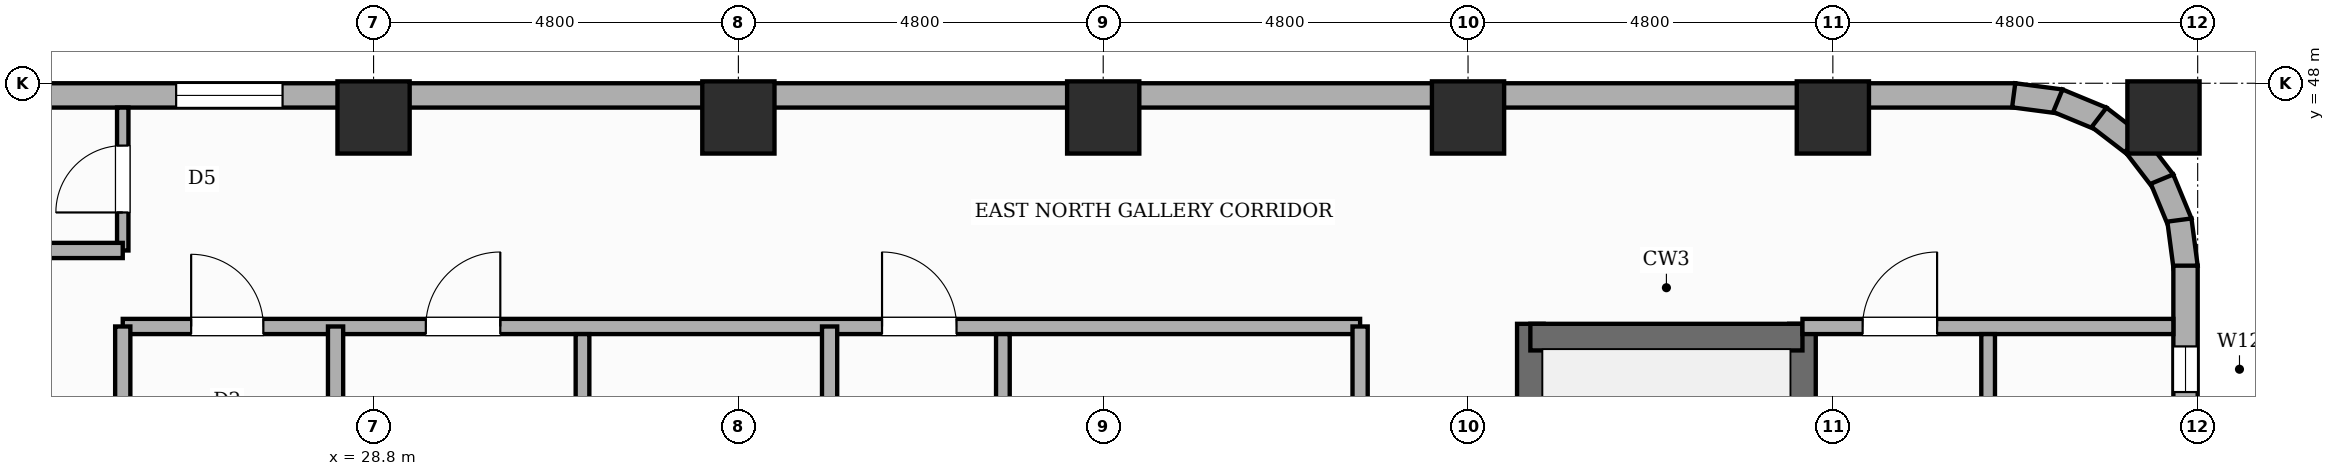
"""IFC4 building model, lengths in metres.
Left out: names, types, materials, properties, quantities, classifications, styles, units other than length and angle.
Written with IfcOpenShell. Run it as: python <this file> out.ifc"""

import sys

from ifc_helpers import new_model, si_unit, direction, frame, frame_2d, origin, origin_2d, place, context, subcontext, project, spatial, rectangle, extrude, element, fill, save


model = new_model("IFC4")
c1 = context("Model", 3, precision=1e-05, world=origin(), true_north=direction((0.0, 1.0)))
c2 = subcontext(c1, "Body", "Model", "MODEL_VIEW")
j1 = project(units=[si_unit("LENGTHUNIT", "METRE"), si_unit("PLANEANGLEUNIT", "RADIAN")], contexts=[c1])
p1 = place(None, origin())
s1 = spatial("IfcSite", under=j1, at=p1, CompositionType="ELEMENT")
p2 = place(p1, origin())
s2 = spatial("IfcBuilding", under=s1, at=p2, CompositionType="ELEMENT")
p3 = place(p2, frame((0.0, 0.0, 110.8)))
s3 = spatial("IfcBuildingStorey", under=s2, at=p3, CompositionType="ELEMENT", Elevation=110.8)
p4 = place(p3, frame((44.02, 35.865, 0.0), z_axis=(0.0, 0.0, 1.0), x_axis=(0.0, 1.0, 0.0)))
e1 = element("IfcWall", 1, at=p4, inside=s3, PredefinedType="SHEAR", context=c2, shape_type="SweptSolid", body=[
    extrude(rectangle(XDim=8.97, YDim=0.35, at=frame_2d((4.485, 0.0))), origin(), (0.0, 0.0, 1.0), 3.6),
])
p5 = place(p4, frame((0.65, 0.0, 0.0)))
e2 = element("IfcOpeningElement", 2, at=p5, cuts=e1, PredefinedType="OPENING", context=c2, shape_type="SweptSolid", body=[
    extrude(rectangle(XDim=0.95, YDim=2.1, at=frame_2d((0.475, 1.05))), frame((0.0, 0.185, 0.0), z_axis=(0.0, -1.0, 0.0), x_axis=(1.0, 0.0, 0.0)), (0.0, 0.0, 1.0), 0.37),
])
p6 = place(p3, frame((47.6, 35.865, 0.0), z_axis=(0.0, 0.0, 1.0), x_axis=(0.0, 1.0, 0.0)))
e3 = element("IfcWall", 3, at=p6, inside=s3, PredefinedType="SHEAR", context=c2, shape_type="SweptSolid", body=[
    extrude(rectangle(XDim=8.97, YDim=0.35, at=frame_2d((4.485, 0.0))), origin(), (0.0, 0.0, 1.0), 3.6),
])
p7 = place(p3, frame((44.02, 44.66, 0.0), z_axis=(0.0, 0.0, 1.0), x_axis=(1.0, 0.0, 0.0)))
e4 = element("IfcWall", 4, at=p7, inside=s3, PredefinedType="SHEAR", context=c2, shape_type="SweptSolid", body=[
    extrude(rectangle(XDim=3.58, YDim=0.35, at=frame_2d((1.79, 0.0))), origin(), (0.0, 0.0, 1.0), 3.6),
])
for number, where, z_axis, x_axis in (
    (5, (28.8, 47.55, 0.0), (0.0, 0.0, 1.0), (1.0, 0.0, 0.0)),
    (6, (33.6, 47.55, 0.0), (0.0, 0.0, 1.0), (1.0, 0.0, 0.0)),
    (7, (38.4, 47.55, 0.0), (0.0, 0.0, 1.0), (1.0, 0.0, 0.0)),
    (8, (43.2, 47.55, 0.0), (0.0, 0.0, 1.0), (1.0, 0.0, 0.0)),
    (9, (48.0, 47.55, 0.0), (0.0, 0.0, 1.0), (1.0, 0.0, 0.0)),
    (10, (52.35, 47.55, 0.0), (0.0, 0.0, 1.0), (1.0, 0.0, 0.0)),
):
    element("IfcColumn", number, at=place(p3, frame(where, z_axis=z_axis, x_axis=x_axis)), inside=s3, PredefinedType="COLUMN", context=c2, shape_type="SweptSolid", body=[
        extrude(rectangle(XDim=0.95, YDim=0.95, at=origin_2d()), origin(), (0.0, 0.0, 1.0), 3.6),
    ])
p8 = place(p3, frame((7.2, 47.84, 0.0), z_axis=(0.0, 0.0, 1.0), x_axis=(1.0, 0.0, 0.0)))
e11 = element("IfcWall", 11, at=p8, inside=s3, PredefinedType="STANDARD", context=c2, shape_type="SweptSolid", body=[
    extrude(rectangle(XDim=43.2, YDim=0.32, at=frame_2d((21.6, 0.0))), origin(), (0.0, 0.0, 1.0), 2.54),
])
p9 = place(p8, frame((19.002, 0.0, 0.65)))
e12 = element("IfcOpeningElement", 12, at=p9, cuts=e11, PredefinedType="OPENING", context=c2, shape_type="SweptSolid", body=[
    extrude(rectangle(XDim=1.4, YDim=1.1, at=frame_2d((0.7, 0.55))), frame((0.0, 0.17, 0.0), z_axis=(0.0, -1.0, 0.0), x_axis=(1.0, 0.0, 0.0)), (0.0, 0.0, 1.0), 0.34),
])
p10 = place(p8, frame((0.282, 0.0, 0.65)))
e13 = element("IfcOpeningElement", 13, at=p10, cuts=e11, PredefinedType="OPENING", context=c2, shape_type="SweptSolid", body=[
    extrude(rectangle(XDim=1.4, YDim=1.1, at=frame_2d((0.7, 0.55))), frame((0.0, 0.17, 0.0), z_axis=(0.0, -1.0, 0.0), x_axis=(1.0, 0.0, 0.0)), (0.0, 0.0, 1.0), 0.34),
])
p11 = place(p8, frame((5.478, 0.0, 0.45)))
e14 = element("IfcOpeningElement", 14, at=p11, cuts=e11, PredefinedType="OPENING", context=c2, shape_type="SweptSolid", body=[
    extrude(rectangle(XDim=0.95, YDim=1.8, at=frame_2d((0.475, 0.9))), frame((0.0, 0.17, 0.0), z_axis=(0.0, -1.0, 0.0), x_axis=(1.0, 0.0, 0.0)), (0.0, 0.0, 1.0), 0.34),
])
for number, where, z_axis, x_axis in (
    (15, (50.379, 47.841, 0.0), (0.0, 0.0, 1.0), (0.991, -0.131, 0.0)),
    (16, (50.96, 47.771, 0.0), (0.0, 0.0, 1.0), (0.924, -0.383, 0.0)),
    (17, (51.503, 47.552, 0.0), (0.0, 0.0, 1.0), (0.793, -0.609, 0.0)),
    (18, (51.97, 47.2, 0.0), (0.0, 0.0, 1.0), (0.609, -0.793, 0.0)),
    (19, (52.331, 46.739, 0.0), (0.0, 0.0, 1.0), (0.382, -0.924, 0.0)),
    (20, (52.56, 46.2, 0.0), (0.0, 0.0, 1.0), (0.131, -0.991, 0.0)),
):
    element("IfcWall", number, at=place(p3, frame(where, z_axis=z_axis, x_axis=x_axis)), inside=s3, PredefinedType="STANDARD", context=c2, shape_type="SweptSolid", body=[
        extrude(rectangle(XDim=0.626, YDim=0.32, at=frame_2d((0.313, 0.0))), origin(), (0.0, 0.0, 1.0), 2.54),
    ])
p12 = place(p3, frame((52.64, 45.6, 0.0), z_axis=(0.0, 0.0, 1.0), x_axis=(0.0, -1.0, 0.0)))
e21 = element("IfcWall", 21, at=p12, inside=s3, PredefinedType="STANDARD", context=c2, shape_type="SweptSolid", body=[
    extrude(rectangle(XDim=14.4, YDim=0.32, at=frame_2d((7.2, 0.0))), origin(), (0.0, 0.0, 1.0), 2.54),
])
p13 = place(p12, frame((8.8, 0.0, 0.0)))
e22 = element("IfcOpeningElement", 22, at=p13, cuts=e21, PredefinedType="OPENING", context=c2, shape_type="SweptSolid", body=[
    extrude(rectangle(XDim=1.1, YDim=2.15, at=frame_2d((0.55, 1.075))), frame((0.0, 0.17, 0.0), z_axis=(0.0, -1.0, 0.0), x_axis=(1.0, 0.0, 0.0)), (0.0, 0.0, 1.0), 0.34),
])
p14 = place(p12, frame((10.52, 0.0, 0.45)))
e23 = element("IfcOpeningElement", 23, at=p14, cuts=e21, PredefinedType="OPENING", context=c2, shape_type="SweptSolid", body=[
    extrude(rectangle(XDim=0.75, YDim=1.8, at=frame_2d((0.375, 0.9))), frame((0.0, 0.17, 0.0), z_axis=(0.0, -1.0, 0.0), x_axis=(1.0, 0.0, 0.0)), (0.0, 0.0, 1.0), 0.34),
])
p15 = place(p12, frame((1.062, 0.0, 0.45)))
e24 = element("IfcOpeningElement", 24, at=p15, cuts=e21, PredefinedType="OPENING", context=c2, shape_type="SweptSolid", body=[
    extrude(rectangle(XDim=0.6, YDim=1.8, at=frame_2d((0.3, 0.9))), frame((0.0, 0.17, 0.0), z_axis=(0.0, -1.0, 0.0), x_axis=(1.0, 0.0, 0.0)), (0.0, 0.0, 1.0), 0.34),
])
p16 = place(p12, frame((5.486, 0.0, 0.45)))
e25 = element("IfcOpeningElement", 25, at=p16, cuts=e21, PredefinedType="OPENING", context=c2, shape_type="SweptSolid", body=[
    extrude(rectangle(XDim=0.95, YDim=1.8, at=frame_2d((0.475, 0.9))), frame((0.0, 0.17, 0.0), z_axis=(0.0, -1.0, 0.0), x_axis=(1.0, 0.0, 0.0)), (0.0, 0.0, 1.0), 0.34),
])
p17 = place(p3, frame((25.5, 45.8, 0.0), z_axis=(0.0, 0.0, 1.0), x_axis=(0.0, 1.0, 0.0)))
e26 = element("IfcWall", 26, at=p17, inside=s3, PredefinedType="PARTITIONING", context=c2, shape_type="SweptSolid", body=[
    extrude(rectangle(XDim=1.88, YDim=0.15, at=frame_2d((0.94, 0.0))), origin(), (0.0, 0.0, 1.0), 3.36),
])
p18 = place(p17, frame((0.5, 0.0, 0.0)))
e27 = element("IfcOpeningElement", 27, at=p18, cuts=e26, PredefinedType="OPENING", context=c2, shape_type="SweptSolid", body=[
    extrude(rectangle(XDim=0.88, YDim=2.1, at=frame_2d((0.44, 1.05))), frame((0.0, 0.085, 0.0), z_axis=(0.0, -1.0, 0.0), x_axis=(1.0, 0.0, 0.0)), (0.0, 0.0, 1.0), 0.17),
])
p19 = place(p3, frame((22.75, 45.8, 0.0), z_axis=(0.0, 0.0, 1.0), x_axis=(1.0, 0.0, 0.0)))
e28 = element("IfcWall", 28, at=p19, inside=s3, PredefinedType="PARTITIONING", context=c2, shape_type="SweptSolid", body=[
    extrude(rectangle(XDim=2.75, YDim=0.2, at=frame_2d((1.375, 0.0))), origin(), (0.0, 0.0, 1.0), 3.36),
])
p20 = place(p3, frame((25.5, 44.8, 0.0), z_axis=(0.0, 0.0, 1.0), x_axis=(1.0, 0.0, 0.0)))
e29 = element("IfcWall", 29, at=p20, inside=s3, PredefinedType="PARTITIONING", context=c2, shape_type="SweptSolid", body=[
    extrude(rectangle(XDim=16.28, YDim=0.2, at=frame_2d((8.14, 0.0))), origin(), (0.0, 0.0, 1.0), 3.36),
])
p21 = place(p20, frame((0.9, 0.0, 0.0)))
e30 = element("IfcOpeningElement", 30, at=p21, cuts=e29, PredefinedType="OPENING", context=c2, shape_type="SweptSolid", body=[
    extrude(rectangle(XDim=0.95, YDim=2.15, at=frame_2d((0.475, 1.075))), frame((0.0, 0.11, 0.0), z_axis=(0.0, -1.0, 0.0), x_axis=(1.0, 0.0, 0.0)), (0.0, 0.0, 1.0), 0.22),
])
p22 = place(p20, frame((3.988, 0.0, 0.0)))
e31 = element("IfcOpeningElement", 31, at=p22, cuts=e29, PredefinedType="OPENING", context=c2, shape_type="SweptSolid", body=[
    extrude(rectangle(XDim=0.98, YDim=2.18, at=frame_2d((0.49, 1.09))), frame((0.0, 0.11, 0.0), z_axis=(0.0, -1.0, 0.0), x_axis=(1.0, 0.0, 0.0)), (0.0, 0.0, 1.0), 0.22),
])
p23 = place(p20, frame((9.99, 0.0, 0.0)))
e32 = element("IfcOpeningElement", 32, at=p23, cuts=e29, PredefinedType="OPENING", context=c2, shape_type="SweptSolid", body=[
    extrude(rectangle(XDim=0.98, YDim=2.18, at=frame_2d((0.49, 1.09))), frame((0.0, 0.11, 0.0), z_axis=(0.0, -1.0, 0.0), x_axis=(1.0, 0.0, 0.0)), (0.0, 0.0, 1.0), 0.22),
])
p24 = place(p3, frame((47.6, 44.8, 0.0), z_axis=(0.0, 0.0, 1.0), x_axis=(1.0, 0.0, 0.0)))
e33 = element("IfcWall", 33, at=p24, inside=s3, PredefinedType="PARTITIONING", context=c2, shape_type="SweptSolid", body=[
    extrude(rectangle(XDim=4.88, YDim=0.2, at=frame_2d((2.44, 0.0))), origin(), (0.0, 0.0, 1.0), 3.36),
])
p25 = place(p24, frame((0.792, 0.0, 0.0)))
e34 = element("IfcOpeningElement", 34, at=p25, cuts=e33, PredefinedType="OPENING", context=c2, shape_type="SweptSolid", body=[
    extrude(rectangle(XDim=0.98, YDim=2.18, at=frame_2d((0.49, 1.09))), frame((0.0, 0.11, 0.0), z_axis=(0.0, -1.0, 0.0), x_axis=(1.0, 0.0, 0.0)), (0.0, 0.0, 1.0), 0.22),
])
p26 = place(p3, frame((25.5, 39.95, 0.0), z_axis=(0.0, 0.0, 1.0), x_axis=(0.0, 1.0, 0.0)))
e35 = element("IfcWall", 35, at=p26, inside=s3, PredefinedType="PARTITIONING", context=c2, shape_type="SweptSolid", body=[
    extrude(rectangle(XDim=4.85, YDim=0.2, at=frame_2d((2.425, 0.0))), origin(), (0.0, 0.0, 1.0), 3.36),
])
p27 = place(p3, frame((41.78, 36.05, 0.0), z_axis=(0.0, 0.0, 1.0), x_axis=(0.0, 1.0, 0.0)))
e36 = element("IfcWall", 36, at=p27, inside=s3, PredefinedType="PARTITIONING", context=c2, shape_type="SweptSolid", body=[
    extrude(rectangle(XDim=8.75, YDim=0.2, at=frame_2d((4.375, 0.0))), origin(), (0.0, 0.0, 1.0), 3.36),
])
p28 = place(p3, frame((28.3, 29.12, 0.0), z_axis=(0.0, 0.0, 1.0), x_axis=(0.0, 1.0, 0.0)))
e37 = element("IfcWall", 37, at=p28, inside=s3, PredefinedType="SOLIDWALL", context=c2, shape_type="SweptSolid", body=[
    extrude(rectangle(XDim=15.68, YDim=0.2, at=frame_2d((7.84, 0.0))), origin(), (0.0, 0.0, 1.0), 3.36),
])
p29 = place(p3, frame((31.549, 29.12, 0.0), z_axis=(0.0, 0.0, 1.0), x_axis=(0.0, 1.0, 0.0)))
e38 = element("IfcWall", 38, at=p29, inside=s3, PredefinedType="PLUMBINGWALL", context=c2, shape_type="SweptSolid", body=[
    extrude(rectangle(XDim=15.58, YDim=0.18, at=frame_2d((7.79, 0.0))), origin(), (0.0, 0.0, 1.0), 3.36),
])
p30 = place(p29, frame((2.323, 0.0, 0.0)))
e39 = element("IfcOpeningElement", 39, at=p30, cuts=e38, PredefinedType="OPENING", context=c2, shape_type="SweptSolid", body=[
    extrude(rectangle(XDim=0.9, YDim=2.15, at=frame_2d((0.45, 1.075))), frame((0.0, 0.1, 0.0), z_axis=(0.0, -1.0, 0.0), x_axis=(1.0, 0.0, 0.0)), (0.0, 0.0, 1.0), 0.2),
])
p31 = place(p29, frame((8.103, 0.0, 0.0)))
e40 = element("IfcOpeningElement", 40, at=p31, cuts=e38, PredefinedType="OPENING", context=c2, shape_type="SweptSolid", body=[
    extrude(rectangle(XDim=0.9, YDim=2.15, at=frame_2d((0.45, 1.075))), frame((0.0, 0.1, 0.0), z_axis=(0.0, -1.0, 0.0), x_axis=(1.0, 0.0, 0.0)), (0.0, 0.0, 1.0), 0.2),
])
p32 = place(p29, frame((12.677, 0.0, 0.0)))
e41 = element("IfcOpeningElement", 41, at=p32, cuts=e38, PredefinedType="OPENING", context=c2, shape_type="SweptSolid", body=[
    extrude(rectangle(XDim=0.86, YDim=2.1, at=frame_2d((0.43, 1.05))), frame((0.0, 0.1, 0.0), z_axis=(0.0, -1.0, 0.0), x_axis=(1.0, 0.0, 0.0)), (0.0, 0.0, 1.0), 0.2),
])
p33 = place(p3, frame((34.8, 29.12, 0.0), z_axis=(0.0, 0.0, 1.0), x_axis=(0.0, 1.0, 0.0)))
e42 = element("IfcWall", 42, at=p33, inside=s3, PredefinedType="SOLIDWALL", context=c2, shape_type="SweptSolid", body=[
    extrude(rectangle(XDim=15.68, YDim=0.2, at=frame_2d((7.84, 0.0))), origin(), (0.0, 0.0, 1.0), 3.36),
])
p34 = place(p3, frame((37.08, 29.12, 0.0), z_axis=(0.0, 0.0, 1.0), x_axis=(0.0, 1.0, 0.0)))
e43 = element("IfcWall", 43, at=p34, inside=s3, PredefinedType="PLUMBINGWALL", context=c2, shape_type="SweptSolid", body=[
    extrude(rectangle(XDim=15.58, YDim=0.18, at=frame_2d((7.79, 0.0))), origin(), (0.0, 0.0, 1.0), 3.36),
])
p35 = place(p34, frame((2.323, 0.0, 0.0)))
e44 = element("IfcOpeningElement", 44, at=p35, cuts=e43, PredefinedType="OPENING", context=c2, shape_type="SweptSolid", body=[
    extrude(rectangle(XDim=0.9, YDim=2.15, at=frame_2d((0.45, 1.075))), frame((0.0, 0.1, 0.0), z_axis=(0.0, -1.0, 0.0), x_axis=(1.0, 0.0, 0.0)), (0.0, 0.0, 1.0), 0.2),
])
p36 = place(p34, frame((8.431, 0.0, 0.0)))
e45 = element("IfcOpeningElement", 45, at=p36, cuts=e43, PredefinedType="OPENING", context=c2, shape_type="SweptSolid", body=[
    extrude(rectangle(XDim=0.9, YDim=2.15, at=frame_2d((0.45, 1.075))), frame((0.0, 0.1, 0.0), z_axis=(0.0, -1.0, 0.0), x_axis=(1.0, 0.0, 0.0)), (0.0, 0.0, 1.0), 0.2),
])
p37 = place(p34, frame((13.077, 0.0, 0.0)))
e46 = element("IfcOpeningElement", 46, at=p37, cuts=e43, PredefinedType="OPENING", context=c2, shape_type="SweptSolid", body=[
    extrude(rectangle(XDim=0.86, YDim=2.1, at=frame_2d((0.43, 1.05))), frame((0.0, 0.1, 0.0), z_axis=(0.0, -1.0, 0.0), x_axis=(1.0, 0.0, 0.0)), (0.0, 0.0, 1.0), 0.2),
])
p38 = place(p3, frame((50.043, 29.12, 0.0), z_axis=(0.0, 0.0, 1.0), x_axis=(0.0, 1.0, 0.0)))
e47 = element("IfcWall", 47, at=p38, inside=s3, PredefinedType="PLUMBINGWALL", context=c2, shape_type="SweptSolid", body=[
    extrude(rectangle(XDim=15.58, YDim=0.18, at=frame_2d((7.79, 0.0))), origin(), (0.0, 0.0, 1.0), 3.36),
])
p39 = place(p38, frame((2.183, 0.0, 0.0)))
e48 = element("IfcOpeningElement", 48, at=p39, cuts=e47, PredefinedType="OPENING", context=c2, shape_type="SweptSolid", body=[
    extrude(rectangle(XDim=0.9, YDim=2.15, at=frame_2d((0.45, 1.075))), frame((0.0, 0.1, 0.0), z_axis=(0.0, -1.0, 0.0), x_axis=(1.0, 0.0, 0.0)), (0.0, 0.0, 1.0), 0.2),
])
p40 = place(p38, frame((7.959, 0.0, 0.0)))
e49 = element("IfcOpeningElement", 49, at=p40, cuts=e47, PredefinedType="OPENING", context=c2, shape_type="SweptSolid", body=[
    extrude(rectangle(XDim=0.9, YDim=2.15, at=frame_2d((0.45, 1.075))), frame((0.0, 0.1, 0.0), z_axis=(0.0, -1.0, 0.0), x_axis=(1.0, 0.0, 0.0)), (0.0, 0.0, 1.0), 0.2),
])
p41 = place(p38, frame((12.711, 0.0, 0.0)))
e50 = element("IfcOpeningElement", 50, at=p41, cuts=e47, PredefinedType="OPENING", context=c2, shape_type="SweptSolid", body=[
    extrude(rectangle(XDim=0.86, YDim=2.1, at=frame_2d((0.43, 1.05))), frame((0.0, 0.1, 0.0), z_axis=(0.0, -1.0, 0.0), x_axis=(1.0, 0.0, 0.0)), (0.0, 0.0, 1.0), 0.2),
])
p42 = place(p9, origin())
e51 = element("IfcWindow", 51, at=p42, inside=s3, PartitioningType="SINGLE_PANEL", PredefinedType="WINDOW", context=c2, shape_type="SweptSolid", body=[
    extrude(rectangle(XDim=1.4, YDim=1.1, at=frame_2d((0.7, 0.55))), frame((0.0, 0.03, 0.0), z_axis=(0.0, -1.0, 0.0), x_axis=(1.0, 0.0, 0.0)), (0.0, 0.0, 1.0), 0.06),
])
fill(e12, e51)
p43 = place(p15, origin())
e52 = element("IfcWindow", 52, at=p43, inside=s3, PartitioningType="SINGLE_PANEL", PredefinedType="WINDOW", context=c2, shape_type="SweptSolid", body=[
    extrude(rectangle(XDim=0.6, YDim=1.8, at=frame_2d((0.3, 0.9))), frame((0.0, 0.03, 0.0), z_axis=(0.0, -1.0, 0.0), x_axis=(1.0, 0.0, 0.0)), (0.0, 0.0, 1.0), 0.06),
])
fill(e24, e52)
p44 = place(p18, origin())
e53 = element("IfcDoor", 53, at=p44, inside=s3, OperationType="SINGLE_SWING_LEFT", PredefinedType="DOOR", context=c2, shape_type="SweptSolid", body=[
    extrude(rectangle(XDim=0.88, YDim=2.1, at=frame_2d((0.44, 1.05))), frame((0.0, 0.025, 0.0), z_axis=(0.0, -1.0, 0.0), x_axis=(1.0, 0.0, 0.0)), (0.0, 0.0, 1.0), 0.05),
])
fill(e27, e53)
p45 = place(p21, origin())
e54 = element("IfcDoor", 54, at=p45, inside=s3, OperationType="SINGLE_SWING_LEFT", PredefinedType="DOOR", context=c2, shape_type="SweptSolid", body=[
    extrude(rectangle(XDim=0.95, YDim=2.15, at=frame_2d((0.475, 1.075))), frame((0.0, 0.025, 0.0), z_axis=(0.0, -1.0, 0.0), x_axis=(1.0, 0.0, 0.0)), (0.0, 0.0, 1.0), 0.05),
])
fill(e30, e54)
p46 = place(p22, origin())
e55 = element("IfcDoor", 55, at=p46, inside=s3, OperationType="SINGLE_SWING_RIGHT", PredefinedType="DOOR", context=c2, shape_type="SweptSolid", body=[
    extrude(rectangle(XDim=0.98, YDim=2.18, at=frame_2d((0.49, 1.09))), frame((0.0, 0.025, 0.0), z_axis=(0.0, -1.0, 0.0), x_axis=(1.0, 0.0, 0.0)), (0.0, 0.0, 1.0), 0.05),
])
fill(e31, e55)
p47 = place(p23, origin())
e56 = element("IfcDoor", 56, at=p47, inside=s3, OperationType="SINGLE_SWING_LEFT", PredefinedType="DOOR", context=c2, shape_type="SweptSolid", body=[
    extrude(rectangle(XDim=0.98, YDim=2.18, at=frame_2d((0.49, 1.09))), frame((0.0, 0.025, 0.0), z_axis=(0.0, -1.0, 0.0), x_axis=(1.0, 0.0, 0.0)), (0.0, 0.0, 1.0), 0.05),
])
fill(e32, e56)
p48 = place(p25, origin())
e57 = element("IfcDoor", 57, at=p48, inside=s3, OperationType="SINGLE_SWING_RIGHT", PredefinedType="DOOR", context=c2, shape_type="SweptSolid", body=[
    extrude(rectangle(XDim=0.98, YDim=2.18, at=frame_2d((0.49, 1.09))), frame((0.0, 0.025, 0.0), z_axis=(0.0, -1.0, 0.0), x_axis=(1.0, 0.0, 0.0)), (0.0, 0.0, 1.0), 0.05),
])
fill(e34, e57)
save(model, sys.argv[1])
